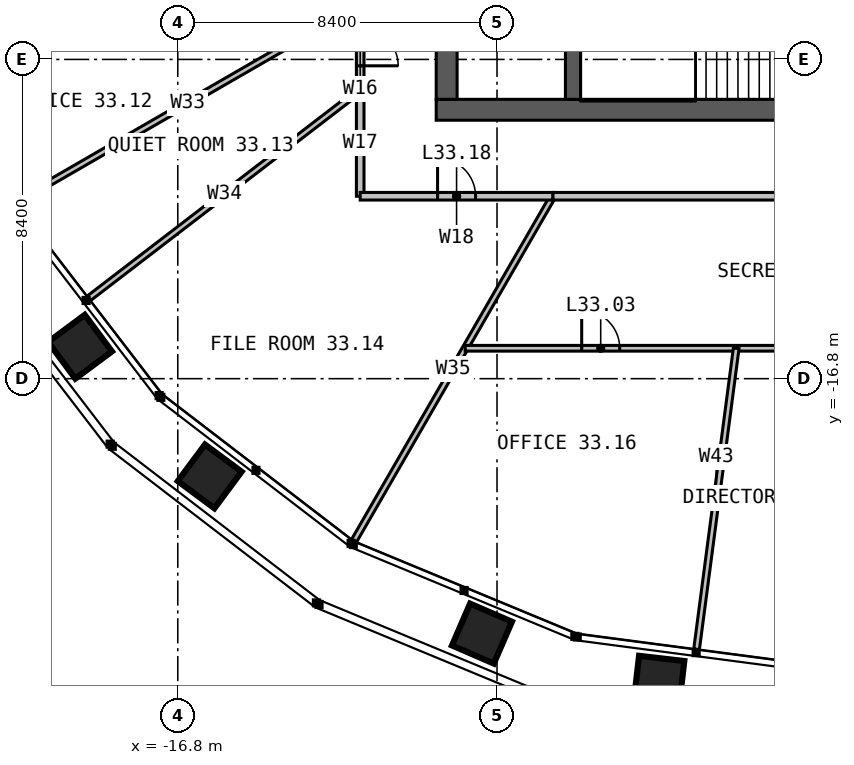
"""IFC4 building model, lengths in metres.
Left out: names, types, materials, properties, quantities, classifications, styles, units other than length and angle.
Written with IfcOpenShell. Run it as: python <this file> out.ifc"""

import sys

from ifc_helpers import new_model, si_unit, direction, frame, frame_2d, origin, place, context, subcontext, project, spatial, rectangle, extrude, element, fill, save


model = new_model("IFC4")
c1 = context("Model", 3, precision=1e-05, world=origin(), true_north=direction((0.0, 1.0)))
c2 = subcontext(c1, "Body", "Model", "MODEL_VIEW")
j1 = project(units=[si_unit("LENGTHUNIT", "METRE"), si_unit("PLANEANGLEUNIT", "RADIAN")], contexts=[c1])
p1 = place(None, origin())
s1 = spatial("IfcSite", under=j1, at=p1, CompositionType="ELEMENT")
p2 = place(p1, origin())
s2 = spatial("IfcBuilding", under=s1, at=p2, CompositionType="ELEMENT")
p3 = place(p2, frame((0.0, 0.0, 138.0)))
s3 = spatial("IfcBuildingStorey", under=s2, at=p3, CompositionType="ELEMENT", Elevation=138.0)
p4 = place(p3, frame((10.0, -9.725, 0.0), z_axis=(0.0, 0.0, 1.0), x_axis=(-1.0, 0.0, 0.0)))
e1 = element("IfcWall", 1, at=p4, inside=s3, PredefinedType="SOLIDWALL", context=c2, shape_type="SweptSolid", body=[
    extrude(rectangle(XDim=20.0, YDim=0.55, at=frame_2d((10.0, 0.0))), origin(), (0.0, 0.0, 1.0), 4.0),
])
p5 = place(p4, frame((6.875, 0.0, 0.0)))
e2 = element("IfcOpeningElement", 2, at=p5, cuts=e1, PredefinedType="OPENING", context=c2, shape_type="SweptSolid", body=[
    extrude(rectangle(XDim=1.2, YDim=2.2, at=frame_2d((0.6, 1.1))), frame((0.0, 0.285, 0.0), z_axis=(0.0, -1.0, 0.0), x_axis=(1.0, 0.0, 0.0)), (0.0, 0.0, 1.0), 0.57),
])
p6 = place(p3, frame((-9.725, 9.45, 0.0), z_axis=(0.0, 0.0, 1.0), x_axis=(0.0, -1.0, 0.0)))
e3 = element("IfcWall", 3, at=p6, inside=s3, PredefinedType="SOLIDWALL", context=c2, shape_type="SweptSolid", body=[
    extrude(rectangle(XDim=18.9, YDim=0.55, at=frame_2d((9.45, 0.0))), origin(), (0.0, 0.0, 1.0), 4.0),
])
p7 = place(p3, frame((-6.4, -9.45, 0.0), z_axis=(0.0, 0.0, 1.0), x_axis=(0.0, 1.0, 0.0)))
e4 = element("IfcWall", 4, at=p7, inside=s3, PredefinedType="SOLIDWALL", context=c2, shape_type="SweptSolid", body=[
    extrude(rectangle(XDim=18.9, YDim=0.4, at=frame_2d((9.45, 0.0))), origin(), (0.0, 0.0, 1.0), 4.0),
])
p8 = place(p7, frame((8.95, 0.0, 0.0)))
e5 = element("IfcOpeningElement", 5, at=p8, cuts=e4, PredefinedType="OPENING", context=c2, shape_type="SweptSolid", body=[
    extrude(rectangle(XDim=1.0, YDim=2.2, at=frame_2d((0.5, 1.1))), frame((0.0, 0.21, 0.0), z_axis=(0.0, -1.0, 0.0), x_axis=(1.0, 0.0, 0.0)), (0.0, 0.0, 1.0), 0.42),
])
p9 = place(p3, frame((-12.0, -6.928, 0.0), z_axis=(0.0, 0.0, 1.0), x_axis=(-0.866029212144, -0.49999340367, 0.0)))
e6 = element("IfcWall", 6, at=p9, inside=s3, PredefinedType="PARTITIONING", context=c2, shape_type="SweptSolid", body=[
    extrude(rectangle(XDim=10.478, YDim=0.15, at=frame_2d((5.239, 0.0))), origin(), (0.0, 0.0, 1.0), 2.79),
])
p10 = place(p3, frame((-12.0, -9.208, 0.0), z_axis=(0.0, 0.0, 1.0), x_axis=(-0.79335350297, -0.608761217002, 0.0)))
e7 = element("IfcWall", 7, at=p10, inside=s3, PredefinedType="PARTITIONING", context=c2, shape_type="SweptSolid", body=[
    extrude(rectangle(XDim=9.0, YDim=0.15, at=frame_2d((4.5, 0.0))), origin(), (0.0, 0.0, 1.0), 2.79),
])
p11 = place(p3, frame((-6.928, -12.0, 0.0), z_axis=(0.0, 0.0, 1.0), x_axis=(-0.49999340367, -0.866029212144, 0.0)))
e8 = element("IfcWall", 8, at=p11, inside=s3, PredefinedType="PARTITIONING", context=c2, shape_type="SweptSolid", body=[
    extrude(rectangle(XDim=10.478, YDim=0.15, at=frame_2d((5.239, 0.0))), origin(), (0.0, 0.0, 1.0), 2.79),
])
p12 = place(p3, frame((-12.0, -6.928, 0.0), z_axis=(0.0, 0.0, 1.0), x_axis=(0.0, -1.0, 0.0)))
e9 = element("IfcWall", 9, at=p12, inside=s3, PredefinedType="PARTITIONING", context=c2, shape_type="SweptSolid", body=[
    extrude(rectangle(XDim=2.28, YDim=0.2, at=frame_2d((1.14, 0.0))), origin(), (0.0, 0.0, 1.0), 3.8),
])
p13 = place(p12, frame((0.64, 0.0, 0.0)))
e10 = element("IfcOpeningElement", 10, at=p13, cuts=e9, PredefinedType="OPENING", context=c2, shape_type="SweptSolid", body=[
    extrude(rectangle(XDim=1.0, YDim=2.2, at=frame_2d((0.5, 1.1))), frame((0.0, 0.11, 0.0), z_axis=(0.0, -1.0, 0.0), x_axis=(1.0, 0.0, 0.0)), (0.0, 0.0, 1.0), 0.22),
])
p14 = place(p3, frame((-12.0, -9.208, 0.0), z_axis=(0.0, 0.0, 1.0), x_axis=(0.0, -1.0, 0.0)))
e11 = element("IfcWall", 11, at=p14, inside=s3, PredefinedType="PARTITIONING", context=c2, shape_type="SweptSolid", body=[
    extrude(rectangle(XDim=2.792, YDim=0.2, at=frame_2d((1.396, 0.0))), origin(), (0.0, 0.0, 1.0), 3.8),
])
p15 = place(p3, frame((-12.0, -12.0, 0.0), z_axis=(0.0, 0.0, 1.0), x_axis=(1.0, 0.0, 0.0)))
e12 = element("IfcWall", 12, at=p15, inside=s3, PredefinedType="PARTITIONING", context=c2, shape_type="SweptSolid", body=[
    extrude(rectangle(XDim=5.072, YDim=0.2, at=frame_2d((2.536, 0.0))), origin(), (0.0, 0.0, 1.0), 3.8),
])
p16 = place(p15, frame((2.036, 0.0, 0.0)))
e13 = element("IfcOpeningElement", 13, at=p16, cuts=e12, PredefinedType="OPENING", context=c2, shape_type="SweptSolid", body=[
    extrude(rectangle(XDim=1.0, YDim=2.2, at=frame_2d((0.5, 1.1))), frame((0.0, 0.11, 0.0), z_axis=(0.0, -1.0, 0.0), x_axis=(1.0, 0.0, 0.0)), (0.0, 0.0, 1.0), 0.22),
])
p17 = place(p3, frame((-9.238, -16.0, 0.0), z_axis=(0.0, 0.0, 1.0), x_axis=(1.0, 0.0, 0.0)))
e14 = element("IfcWall", 14, at=p17, inside=s3, PredefinedType="PARTITIONING", context=c2, shape_type="SweptSolid", body=[
    extrude(rectangle(XDim=18.475, YDim=0.15, at=frame_2d((9.238, 0.0))), origin(), (0.0, 0.0, 1.0), 2.79),
])
p18 = place(p17, frame((3.066, 0.0, 0.0)))
e15 = element("IfcOpeningElement", 15, at=p18, cuts=e14, PredefinedType="OPENING", context=c2, shape_type="SweptSolid", body=[
    extrude(rectangle(XDim=1.0, YDim=2.2, at=frame_2d((0.5, 1.1))), frame((0.0, 0.085, 0.0), z_axis=(0.0, -1.0, 0.0), x_axis=(1.0, 0.0, 0.0)), (0.0, 0.0, 1.0), 0.17),
])
p19 = place(p17, frame((8.738, 0.0, 0.0)))
e16 = element("IfcOpeningElement", 16, at=p19, cuts=e14, PredefinedType="OPENING", context=c2, shape_type="SweptSolid", body=[
    extrude(rectangle(XDim=1.0, YDim=2.2, at=frame_2d((0.5, 1.1))), frame((0.0, 0.085, 0.0), z_axis=(0.0, -1.0, 0.0), x_axis=(1.0, 0.0, 0.0)), (0.0, 0.0, 1.0), 0.17),
])
p20 = place(p17, frame((14.41, 0.0, 0.0)))
e17 = element("IfcOpeningElement", 17, at=p20, cuts=e14, PredefinedType="OPENING", context=c2, shape_type="SweptSolid", body=[
    extrude(rectangle(XDim=1.0, YDim=2.2, at=frame_2d((0.5, 1.1))), frame((0.0, 0.085, 0.0), z_axis=(0.0, -1.0, 0.0), x_axis=(1.0, 0.0, 0.0)), (0.0, 0.0, 1.0), 0.17),
])
p21 = place(p3, frame((-2.106, -16.0, 0.0), z_axis=(0.0, 0.0, 1.0), x_axis=(-0.13053594497, -0.991443577351, 0.0)))
e18 = element("IfcWall", 18, at=p21, inside=s3, PredefinedType="PARTITIONING", context=c2, shape_type="SweptSolid", body=[
    extrude(rectangle(XDim=7.988, YDim=0.15, at=frame_2d((3.994, 0.0))), origin(), (0.0, 0.0, 1.0), 2.79),
])
p22 = place(p3, frame((-6.928, -12.0, 0.0), z_axis=(0.0, 0.0, 1.0), x_axis=(1.0, 0.0, 0.0)))
e19 = element("IfcWall", 19, at=p22, inside=s3, PredefinedType="PARTITIONING", context=c2, shape_type="SweptSolid", body=[
    extrude(rectangle(XDim=13.856, YDim=0.2, at=frame_2d((6.928, 0.0))), origin(), (0.0, 0.0, 1.0), 3.8),
])
p23 = place(p22, frame((6.028, 0.0, 0.0)))
e20 = element("IfcOpeningElement", 20, at=p23, cuts=e19, PredefinedType="OPENING", context=c2, shape_type="SweptSolid", body=[
    extrude(rectangle(XDim=1.8, YDim=2.2, at=frame_2d((0.9, 1.1))), frame((0.0, 0.11, 0.0), z_axis=(0.0, -1.0, 0.0), x_axis=(1.0, 0.0, 0.0)), (0.0, 0.0, 1.0), 0.22),
])
p24 = place(p13, origin())
e21 = element("IfcDoor", 21, at=p24, inside=s3, OperationType="SINGLE_SWING_RIGHT", PredefinedType="DOOR", context=c2, shape_type="SweptSolid", body=[
    extrude(rectangle(XDim=1.0, YDim=2.2, at=frame_2d((0.5, 1.1))), frame((0.0, 0.025, 0.0), z_axis=(0.0, -1.0, 0.0), x_axis=(1.0, 0.0, 0.0)), (0.0, 0.0, 1.0), 0.05),
])
fill(e10, e21)
p25 = place(p16, origin())
e22 = element("IfcDoor", 22, at=p25, inside=s3, OperationType="SINGLE_SWING_LEFT", PredefinedType="DOOR", context=c2, shape_type="SweptSolid", body=[
    extrude(rectangle(XDim=1.0, YDim=2.2, at=frame_2d((0.5, 1.1))), frame((0.0, 0.025, 0.0), z_axis=(0.0, -1.0, 0.0), x_axis=(1.0, 0.0, 0.0)), (0.0, 0.0, 1.0), 0.05),
])
fill(e13, e22)
p26 = place(p18, origin())
e23 = element("IfcDoor", 23, at=p26, inside=s3, OperationType="SINGLE_SWING_LEFT", PredefinedType="DOOR", context=c2, shape_type="SweptSolid", body=[
    extrude(rectangle(XDim=1.0, YDim=2.2, at=frame_2d((0.5, 1.1))), frame((0.0, 0.025, 0.0), z_axis=(0.0, -1.0, 0.0), x_axis=(1.0, 0.0, 0.0)), (0.0, 0.0, 1.0), 0.05),
])
fill(e15, e23)
save(model, sys.argv[1])
